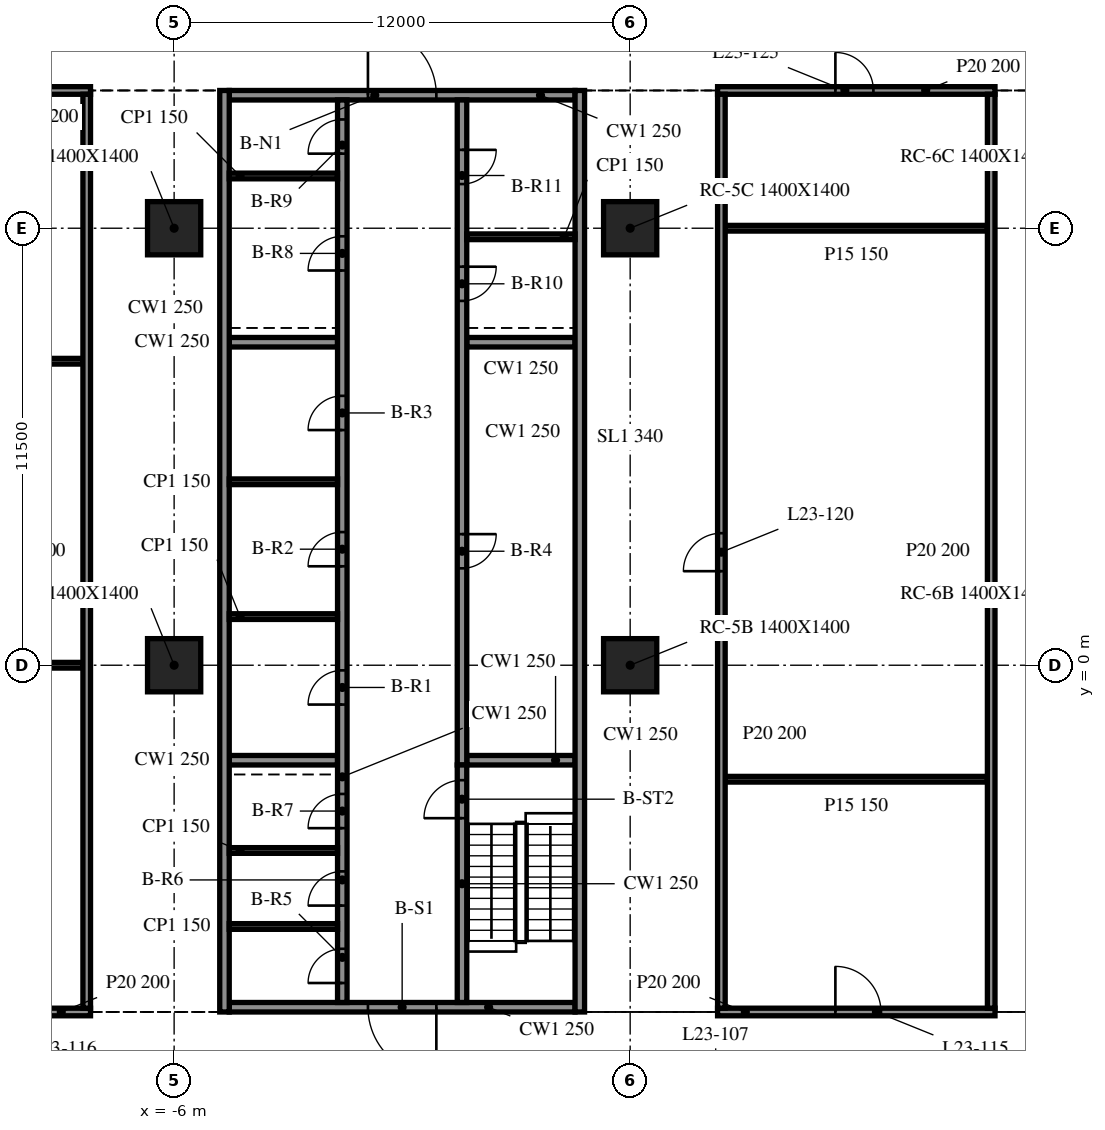
"""IFC4 building model, lengths in metres.
Left out: names, types, materials, properties, quantities, classifications, styles, units other than length and angle.
Written with IfcOpenShell. Run it as: python <this file> out.ifc"""

import sys

from ifc_helpers import new_model, si_unit, direction, frame, frame_2d, origin, origin_2d, place, context, subcontext, project, spatial, rectangle, extrude, element, fill, save


model = new_model("IFC4")
c1 = context("Model", 3, precision=1e-05, world=origin(), true_north=direction((0.0, 1.0)))
c2 = subcontext(c1, "Body", "Model", "MODEL_VIEW")
j1 = project(units=[si_unit("LENGTHUNIT", "METRE"), si_unit("PLANEANGLEUNIT", "RADIAN")], contexts=[c1])
p1 = place(None, origin())
s1 = spatial("IfcSite", under=j1, at=p1, CompositionType="ELEMENT")
p2 = place(p1, origin())
s2 = spatial("IfcBuilding", under=s1, at=p2, CompositionType="ELEMENT")
p3 = place(p2, frame((0.0, 0.0, 101.2)))
s3 = spatial("IfcBuildingStorey", under=s2, at=p3, CompositionType="ELEMENT", Elevation=101.2)
for number, where, z_axis, x_axis in (
    (1, (-6.0, 0.0, -0.34), (0.0, 0.0, 1.0), (1.0, 0.0, 0.0)),
    (2, (-6.0, 11.5, -0.34), (0.0, 0.0, 1.0), (1.0, 0.0, 0.0)),
    (3, (6.0, 0.0, -0.34), (0.0, 0.0, 1.0), (1.0, 0.0, 0.0)),
    (4, (6.0, 11.5, -0.34), (0.0, 0.0, 1.0), (1.0, 0.0, 0.0)),
):
    element("IfcColumn", number, at=place(p3, frame(where, z_axis=z_axis, x_axis=x_axis)), inside=s3, PredefinedType="COLUMN", context=c2, shape_type="SweptSolid", body=[
        extrude(rectangle(XDim=1.4, YDim=1.4, at=origin_2d()), origin(), (0.0, 0.0, 1.0), 4.1),
    ])
for number, where, z_axis, x_axis in (
    (5, (-4.675, 15.125, 0.0), (0.0, 0.0, 1.0), (0.0, -1.0, 0.0)),
    (6, (4.675, -9.125, 0.0), (0.0, 0.0, 1.0), (0.0, 1.0, 0.0)),
):
    element("IfcWall", number, at=place(p3, frame(where, z_axis=z_axis, x_axis=x_axis)), inside=s3, PredefinedType="SOLIDWALL", context=c2, shape_type="SweptSolid", body=[
        extrude(rectangle(XDim=24.25, YDim=0.25, at=frame_2d((12.125, 0.0))), origin(), (0.0, 0.0, 1.0), 3.76),
    ])
p4 = place(p3, frame((4.55, -9.0, 0.0), z_axis=(0.0, 0.0, 1.0), x_axis=(-1.0, 0.0, 0.0)))
e7 = element("IfcWall", 7, at=p4, inside=s3, PredefinedType="SOLIDWALL", context=c2, shape_type="SweptSolid", body=[
    extrude(rectangle(XDim=9.1, YDim=0.25, at=frame_2d((4.55, 0.0))), origin(), (0.0, 0.0, 1.0), 3.76),
])
p5 = place(p4, frame((3.65, 0.0, 0.0)))
e8 = element("IfcOpeningElement", 8, at=p5, cuts=e7, PredefinedType="OPENING", context=c2, shape_type="SweptSolid", body=[
    extrude(rectangle(XDim=1.8, YDim=2.1, at=frame_2d((0.9, 1.05))), frame((0.0, 0.135, 0.0), z_axis=(0.0, -1.0, 0.0), x_axis=(1.0, 0.0, 0.0)), (0.0, 0.0, 1.0), 0.27),
])
p6 = place(p3, frame((-4.55, 15.0, 0.0), z_axis=(0.0, 0.0, 1.0), x_axis=(1.0, 0.0, 0.0)))
e9 = element("IfcWall", 9, at=p6, inside=s3, PredefinedType="SOLIDWALL", context=c2, shape_type="SweptSolid", body=[
    extrude(rectangle(XDim=9.1, YDim=0.25, at=frame_2d((4.55, 0.0))), origin(), (0.0, 0.0, 1.0), 3.76),
])
p7 = place(p6, frame((3.65, 0.0, 0.0)))
e10 = element("IfcOpeningElement", 10, at=p7, cuts=e9, PredefinedType="OPENING", context=c2, shape_type="SweptSolid", body=[
    extrude(rectangle(XDim=1.8, YDim=2.1, at=frame_2d((0.9, 1.05))), frame((0.0, 0.135, 0.0), z_axis=(0.0, -1.0, 0.0), x_axis=(1.0, 0.0, 0.0)), (0.0, 0.0, 1.0), 0.27),
])
p8 = place(p3, frame((-1.575, -8.875, 0.0), z_axis=(0.0, 0.0, 1.0), x_axis=(0.0, 1.0, 0.0)))
e11 = element("IfcWall", 11, at=p8, inside=s3, PredefinedType="SOLIDWALL", context=c2, shape_type="SweptSolid", body=[
    extrude(rectangle(XDim=23.75, YDim=0.25, at=frame_2d((11.875, 0.0))), origin(), (0.0, 0.0, 1.0), 3.76),
])
p9 = place(p8, frame((7.84, 0.0, 0.0)))
e12 = element("IfcOpeningElement", 12, at=p9, cuts=e11, PredefinedType="OPENING", context=c2, shape_type="SweptSolid", body=[
    extrude(rectangle(XDim=0.9, YDim=2.1, at=frame_2d((0.45, 1.05))), frame((0.0, 0.135, 0.0), z_axis=(0.0, -1.0, 0.0), x_axis=(1.0, 0.0, 0.0)), (0.0, 0.0, 1.0), 0.27),
])
p10 = place(p8, frame((11.479, 0.0, 0.0)))
e13 = element("IfcOpeningElement", 13, at=p10, cuts=e11, PredefinedType="OPENING", context=c2, shape_type="SweptSolid", body=[
    extrude(rectangle(XDim=0.9, YDim=2.1, at=frame_2d((0.45, 1.05))), frame((0.0, 0.135, 0.0), z_axis=(0.0, -1.0, 0.0), x_axis=(1.0, 0.0, 0.0)), (0.0, 0.0, 1.0), 0.27),
])
p11 = place(p8, frame((15.064, 0.0, 0.0)))
e14 = element("IfcOpeningElement", 14, at=p11, cuts=e11, PredefinedType="OPENING", context=c2, shape_type="SweptSolid", body=[
    extrude(rectangle(XDim=0.9, YDim=2.1, at=frame_2d((0.45, 1.05))), frame((0.0, 0.135, 0.0), z_axis=(0.0, -1.0, 0.0), x_axis=(1.0, 0.0, 0.0)), (0.0, 0.0, 1.0), 0.27),
])
p12 = place(p8, frame((0.512, 0.0, 0.0)))
e15 = element("IfcOpeningElement", 15, at=p12, cuts=e11, PredefinedType="OPENING", context=c2, shape_type="SweptSolid", body=[
    extrude(rectangle(XDim=0.9, YDim=2.1, at=frame_2d((0.45, 1.05))), frame((0.0, 0.135, 0.0), z_axis=(0.0, -1.0, 0.0), x_axis=(1.0, 0.0, 0.0)), (0.0, 0.0, 1.0), 0.27),
])
p13 = place(p8, frame((2.55, 0.0, 0.0)))
e16 = element("IfcOpeningElement", 16, at=p13, cuts=e11, PredefinedType="OPENING", context=c2, shape_type="SweptSolid", body=[
    extrude(rectangle(XDim=0.9, YDim=2.1, at=frame_2d((0.45, 1.05))), frame((0.0, 0.135, 0.0), z_axis=(0.0, -1.0, 0.0), x_axis=(1.0, 0.0, 0.0)), (0.0, 0.0, 1.0), 0.27),
])
p14 = place(p8, frame((4.587, 0.0, 0.0)))
e17 = element("IfcOpeningElement", 17, at=p14, cuts=e11, PredefinedType="OPENING", context=c2, shape_type="SweptSolid", body=[
    extrude(rectangle(XDim=0.9, YDim=2.1, at=frame_2d((0.45, 1.05))), frame((0.0, 0.135, 0.0), z_axis=(0.0, -1.0, 0.0), x_axis=(1.0, 0.0, 0.0)), (0.0, 0.0, 1.0), 0.27),
])
p15 = place(p8, frame((19.262, 0.0, 0.0)))
e18 = element("IfcOpeningElement", 18, at=p15, cuts=e11, PredefinedType="OPENING", context=c2, shape_type="SweptSolid", body=[
    extrude(rectangle(XDim=0.9, YDim=2.1, at=frame_2d((0.45, 1.05))), frame((0.0, 0.135, 0.0), z_axis=(0.0, -1.0, 0.0), x_axis=(1.0, 0.0, 0.0)), (0.0, 0.0, 1.0), 0.27),
])
p16 = place(p8, frame((22.337, 0.0, 0.0)))
e19 = element("IfcOpeningElement", 19, at=p16, cuts=e11, PredefinedType="OPENING", context=c2, shape_type="SweptSolid", body=[
    extrude(rectangle(XDim=0.9, YDim=2.1, at=frame_2d((0.45, 1.05))), frame((0.0, 0.135, 0.0), z_axis=(0.0, -1.0, 0.0), x_axis=(1.0, 0.0, 0.0)), (0.0, 0.0, 1.0), 0.27),
])
p17 = place(p3, frame((1.575, -8.875, 0.0), z_axis=(0.0, 0.0, 1.0), x_axis=(0.0, 1.0, 0.0)))
e20 = element("IfcWall", 20, at=p17, inside=s3, PredefinedType="SOLIDWALL", context=c2, shape_type="SweptSolid", body=[
    extrude(rectangle(XDim=6.25, YDim=0.25, at=frame_2d((3.125, 0.0))), origin(), (0.0, 0.0, 1.0), 3.76),
])
p18 = place(p17, frame((4.85, 0.0, 0.0)))
e21 = element("IfcOpeningElement", 21, at=p18, cuts=e20, PredefinedType="OPENING", context=c2, shape_type="SweptSolid", body=[
    extrude(rectangle(XDim=1.0, YDim=2.1, at=frame_2d((0.5, 1.05))), frame((0.0, 0.135, 0.0), z_axis=(0.0, -1.0, 0.0), x_axis=(1.0, 0.0, 0.0)), (0.0, 0.0, 1.0), 0.27),
])
p19 = place(p3, frame((1.575, 14.875, 0.0), z_axis=(0.0, 0.0, 1.0), x_axis=(0.0, -1.0, 0.0)))
e22 = element("IfcWall", 22, at=p19, inside=s3, PredefinedType="SOLIDWALL", context=c2, shape_type="SweptSolid", body=[
    extrude(rectangle(XDim=17.5, YDim=0.25, at=frame_2d((8.75, 0.0))), origin(), (0.0, 0.0, 1.0), 3.76),
])
p20 = place(p19, frame((11.425, 0.0, 0.0)))
e23 = element("IfcOpeningElement", 23, at=p20, cuts=e22, PredefinedType="OPENING", context=c2, shape_type="SweptSolid", body=[
    extrude(rectangle(XDim=0.9, YDim=2.1, at=frame_2d((0.45, 1.05))), frame((0.0, 0.135, 0.0), z_axis=(0.0, -1.0, 0.0), x_axis=(1.0, 0.0, 0.0)), (0.0, 0.0, 1.0), 0.27),
])
p21 = place(p19, frame((4.387, 0.0, 0.0)))
e24 = element("IfcOpeningElement", 24, at=p21, cuts=e22, PredefinedType="OPENING", context=c2, shape_type="SweptSolid", body=[
    extrude(rectangle(XDim=0.9, YDim=2.1, at=frame_2d((0.45, 1.05))), frame((0.0, 0.135, 0.0), z_axis=(0.0, -1.0, 0.0), x_axis=(1.0, 0.0, 0.0)), (0.0, 0.0, 1.0), 0.27),
])
p22 = place(p19, frame((1.312, 0.0, 0.0)))
e25 = element("IfcOpeningElement", 25, at=p22, cuts=e22, PredefinedType="OPENING", context=c2, shape_type="SweptSolid", body=[
    extrude(rectangle(XDim=0.9, YDim=2.1, at=frame_2d((0.45, 1.05))), frame((0.0, 0.135, 0.0), z_axis=(0.0, -1.0, 0.0), x_axis=(1.0, 0.0, 0.0)), (0.0, 0.0, 1.0), 0.27),
])
for number, where, z_axis, x_axis in (
    (26, (-4.55, -2.5, 0.0), (0.0, 0.0, 1.0), (1.0, 0.0, 0.0)),
    (27, (-4.55, 8.5, 0.0), (0.0, 0.0, 1.0), (1.0, 0.0, 0.0)),
    (28, (1.7, -2.5, 0.0), (0.0, 0.0, 1.0), (1.0, 0.0, 0.0)),
    (29, (1.7, 8.5, 0.0), (0.0, 0.0, 1.0), (1.0, 0.0, 0.0)),
):
    element("IfcWall", number, at=place(p3, frame(where, z_axis=z_axis, x_axis=x_axis)), inside=s3, PredefinedType="SOLIDWALL", context=c2, shape_type="SweptSolid", body=[
        extrude(rectangle(XDim=2.85, YDim=0.25, at=frame_2d((1.425, 0.0))), origin(), (0.0, 0.0, 1.0), 3.76),
    ])
for number, where, z_axis, x_axis in (
    (30, (-4.55, 1.28, 0.0), (0.0, 0.0, 1.0), (1.0, 0.0, 0.0)),
    (31, (-4.55, 4.827, 0.0), (0.0, 0.0, 1.0), (1.0, 0.0, 0.0)),
    (32, (-4.55, -6.875, 0.0), (0.0, 0.0, 1.0), (1.0, 0.0, 0.0)),
    (33, (-4.55, -4.875, 0.0), (0.0, 0.0, 1.0), (1.0, 0.0, 0.0)),
    (34, (-4.55, 12.875, 0.0), (0.0, 0.0, 1.0), (1.0, 0.0, 0.0)),
    (35, (1.7, 11.275, 0.0), (0.0, 0.0, 1.0), (1.0, 0.0, 0.0)),
):
    element("IfcWall", number, at=place(p3, frame(where, z_axis=z_axis, x_axis=x_axis)), inside=s3, PredefinedType="PARTITIONING", context=c2, shape_type="SweptSolid", body=[
        extrude(rectangle(XDim=2.85, YDim=0.15, at=frame_2d((1.425, 0.0))), origin(), (0.0, 0.0, 1.0), 3.76),
    ])
p23 = place(p3, frame((-15.9, -9.125, 0.0), z_axis=(0.0, 0.0, 1.0), x_axis=(1.0, 0.0, 0.0)))
e36 = element("IfcWall", 36, at=p23, inside=s3, PredefinedType="PARTITIONING", context=c2, shape_type="SweptSolid", body=[
    extrude(rectangle(XDim=7.7, YDim=0.2, at=frame_2d((3.85, 0.0))), origin(), (0.0, 0.0, 1.0), 3.76),
])
p24 = place(p23, frame((3.3, 0.0, 0.0)))
e37 = element("IfcOpeningElement", 37, at=p24, cuts=e36, PredefinedType="OPENING", context=c2, shape_type="SweptSolid", body=[
    extrude(rectangle(XDim=1.2, YDim=2.1, at=frame_2d((0.6, 1.05))), frame((0.0, 0.11, 0.0), z_axis=(0.0, -1.0, 0.0), x_axis=(1.0, 0.0, 0.0)), (0.0, 0.0, 1.0), 0.22),
])
p25 = place(p3, frame((8.3, -9.125, 0.0), z_axis=(0.0, 0.0, 1.0), x_axis=(1.0, 0.0, 0.0)))
e38 = element("IfcWall", 38, at=p25, inside=s3, PredefinedType="PARTITIONING", context=c2, shape_type="SweptSolid", body=[
    extrude(rectangle(XDim=7.3, YDim=0.2, at=frame_2d((3.65, 0.0))), origin(), (0.0, 0.0, 1.0), 3.76),
])
p26 = place(p25, frame((3.1, 0.0, 0.0)))
e39 = element("IfcOpeningElement", 39, at=p26, cuts=e38, PredefinedType="OPENING", context=c2, shape_type="SweptSolid", body=[
    extrude(rectangle(XDim=1.2, YDim=2.1, at=frame_2d((0.6, 1.05))), frame((0.0, 0.11, 0.0), z_axis=(0.0, -1.0, 0.0), x_axis=(1.0, 0.0, 0.0)), (0.0, 0.0, 1.0), 0.22),
])
p27 = place(p3, frame((8.5, -3.0, 0.0), z_axis=(0.0, 0.0, 1.0), x_axis=(1.0, 0.0, 0.0)))
e40 = element("IfcWall", 40, at=p27, inside=s3, PredefinedType="PARTITIONING", context=c2, shape_type="SweptSolid", body=[
    extrude(rectangle(XDim=6.9, YDim=0.15, at=frame_2d((3.45, 0.0))), origin(), (0.0, 0.0, 1.0), 3.76),
])
for number, where, z_axis, x_axis in (
    (41, (-15.7, 0.0, 0.0), (0.0, 0.0, 1.0), (1.0, 0.0, 0.0)),
    (42, (-15.7, 8.0, 0.0), (0.0, 0.0, 1.0), (1.0, 0.0, 0.0)),
):
    element("IfcWall", number, at=place(p3, frame(where, z_axis=z_axis, x_axis=x_axis)), inside=s3, PredefinedType="PARTITIONING", context=c2, shape_type="SweptSolid", body=[
        extrude(rectangle(XDim=7.3, YDim=0.15, at=frame_2d((3.65, 0.0))), origin(), (0.0, 0.0, 1.0), 3.76),
    ])
p28 = place(p3, frame((8.5, 11.5, 0.0), z_axis=(0.0, 0.0, 1.0), x_axis=(1.0, 0.0, 0.0)))
e43 = element("IfcWall", 43, at=p28, inside=s3, PredefinedType="PARTITIONING", context=c2, shape_type="SweptSolid", body=[
    extrude(rectangle(XDim=6.9, YDim=0.15, at=frame_2d((3.45, 0.0))), origin(), (0.0, 0.0, 1.0), 3.76),
])
p29 = place(p3, frame((-15.9, 15.125, 0.0), z_axis=(0.0, 0.0, 1.0), x_axis=(1.0, 0.0, 0.0)))
e44 = element("IfcWall", 44, at=p29, inside=s3, PredefinedType="PARTITIONING", context=c2, shape_type="SweptSolid", body=[
    extrude(rectangle(XDim=7.7, YDim=0.2, at=frame_2d((3.85, 0.0))), origin(), (0.0, 0.0, 1.0), 3.76),
])
p30 = place(p29, frame((3.3, 0.0, 0.0)))
e45 = element("IfcOpeningElement", 45, at=p30, cuts=e44, PredefinedType="OPENING", context=c2, shape_type="SweptSolid", body=[
    extrude(rectangle(XDim=1.0, YDim=2.1, at=frame_2d((0.5, 1.05))), frame((0.0, 0.11, 0.0), z_axis=(0.0, -1.0, 0.0), x_axis=(1.0, 0.0, 0.0)), (0.0, 0.0, 1.0), 0.22),
])
p31 = place(p3, frame((8.3, 15.125, 0.0), z_axis=(0.0, 0.0, 1.0), x_axis=(1.0, 0.0, 0.0)))
e46 = element("IfcWall", 46, at=p31, inside=s3, PredefinedType="PARTITIONING", context=c2, shape_type="SweptSolid", body=[
    extrude(rectangle(XDim=7.3, YDim=0.2, at=frame_2d((3.65, 0.0))), origin(), (0.0, 0.0, 1.0), 3.76),
])
p32 = place(p31, frame((3.1, 0.0, 0.0)))
e47 = element("IfcOpeningElement", 47, at=p32, cuts=e46, PredefinedType="OPENING", context=c2, shape_type="SweptSolid", body=[
    extrude(rectangle(XDim=1.0, YDim=2.1, at=frame_2d((0.5, 1.05))), frame((0.0, 0.11, 0.0), z_axis=(0.0, -1.0, 0.0), x_axis=(1.0, 0.0, 0.0)), (0.0, 0.0, 1.0), 0.22),
])
p33 = place(p3, frame((-8.3, -9.025, 0.0), z_axis=(0.0, 0.0, 1.0), x_axis=(0.0, 1.0, 0.0)))
e48 = element("IfcWall", 48, at=p33, inside=s3, PredefinedType="PARTITIONING", context=c2, shape_type="SweptSolid", body=[
    extrude(rectangle(XDim=24.05, YDim=0.2, at=frame_2d((12.025, 0.0))), origin(), (0.0, 0.0, 1.0), 3.76),
])
p34 = place(p3, frame((8.4, -9.025, 0.0), z_axis=(0.0, 0.0, 1.0), x_axis=(0.0, 1.0, 0.0)))
e49 = element("IfcWall", 49, at=p34, inside=s3, PredefinedType="PARTITIONING", context=c2, shape_type="SweptSolid", body=[
    extrude(rectangle(XDim=24.05, YDim=0.2, at=frame_2d((12.025, 0.0))), origin(), (0.0, 0.0, 1.0), 3.76),
])
p35 = place(p34, frame((11.5, 0.0, 0.0)))
e50 = element("IfcOpeningElement", 50, at=p35, cuts=e49, PredefinedType="OPENING", context=c2, shape_type="SweptSolid", body=[
    extrude(rectangle(XDim=1.0, YDim=2.1, at=frame_2d((0.5, 1.05))), frame((0.0, 0.11, 0.0), z_axis=(0.0, -1.0, 0.0), x_axis=(1.0, 0.0, 0.0)), (0.0, 0.0, 1.0), 0.22),
])
p36 = place(p3, frame((15.5, -9.025, 0.0), z_axis=(0.0, 0.0, 1.0), x_axis=(0.0, 1.0, 0.0)))
e51 = element("IfcWall", 51, at=p36, inside=s3, PredefinedType="PARTITIONING", context=c2, shape_type="SweptSolid", body=[
    extrude(rectangle(XDim=24.05, YDim=0.2, at=frame_2d((12.025, 0.0))), origin(), (0.0, 0.0, 1.0), 3.76),
])
p37 = place(p5, origin())
e52 = element("IfcDoor", 52, at=p37, inside=s3, OperationType="DOUBLE_DOOR_SINGLE_SWING", PredefinedType="DOOR", context=c2, shape_type="SweptSolid", body=[
    extrude(rectangle(XDim=1.8, YDim=2.1, at=frame_2d((0.9, 1.05))), frame((0.0, 0.025, 0.0), z_axis=(0.0, -1.0, 0.0), x_axis=(1.0, 0.0, 0.0)), (0.0, 0.0, 1.0), 0.05),
])
fill(e8, e52)
p38 = place(p7, origin())
e53 = element("IfcDoor", 53, at=p38, inside=s3, OperationType="DOUBLE_DOOR_SINGLE_SWING", PredefinedType="DOOR", context=c2, shape_type="SweptSolid", body=[
    extrude(rectangle(XDim=1.8, YDim=2.1, at=frame_2d((0.9, 1.05))), frame((0.0, 0.025, 0.0), z_axis=(0.0, -1.0, 0.0), x_axis=(1.0, 0.0, 0.0)), (0.0, 0.0, 1.0), 0.05),
])
fill(e10, e53)
p39 = place(p9, origin())
e54 = element("IfcDoor", 54, at=p39, inside=s3, OperationType="SINGLE_SWING_LEFT", PredefinedType="DOOR", context=c2, shape_type="SweptSolid", body=[
    extrude(rectangle(XDim=0.9, YDim=2.1, at=frame_2d((0.45, 1.05))), frame((0.0, 0.025, 0.0), z_axis=(0.0, -1.0, 0.0), x_axis=(1.0, 0.0, 0.0)), (0.0, 0.0, 1.0), 0.05),
])
fill(e12, e54)
p40 = place(p10, origin())
e55 = element("IfcDoor", 55, at=p40, inside=s3, OperationType="SINGLE_SWING_RIGHT", PredefinedType="DOOR", context=c2, shape_type="SweptSolid", body=[
    extrude(rectangle(XDim=0.9, YDim=2.1, at=frame_2d((0.45, 1.05))), frame((0.0, 0.025, 0.0), z_axis=(0.0, -1.0, 0.0), x_axis=(1.0, 0.0, 0.0)), (0.0, 0.0, 1.0), 0.05),
])
fill(e13, e55)
p41 = place(p11, origin())
e56 = element("IfcDoor", 56, at=p41, inside=s3, OperationType="SINGLE_SWING_LEFT", PredefinedType="DOOR", context=c2, shape_type="SweptSolid", body=[
    extrude(rectangle(XDim=0.9, YDim=2.1, at=frame_2d((0.45, 1.05))), frame((0.0, 0.025, 0.0), z_axis=(0.0, -1.0, 0.0), x_axis=(1.0, 0.0, 0.0)), (0.0, 0.0, 1.0), 0.05),
])
fill(e14, e56)
p42 = place(p20, origin())
e57 = element("IfcDoor", 57, at=p42, inside=s3, OperationType="SINGLE_SWING_RIGHT", PredefinedType="DOOR", context=c2, shape_type="SweptSolid", body=[
    extrude(rectangle(XDim=0.9, YDim=2.1, at=frame_2d((0.45, 1.05))), frame((0.0, 0.025, 0.0), z_axis=(0.0, -1.0, 0.0), x_axis=(1.0, 0.0, 0.0)), (0.0, 0.0, 1.0), 0.05),
])
fill(e23, e57)
p43 = place(p12, origin())
e58 = element("IfcDoor", 58, at=p43, inside=s3, OperationType="SINGLE_SWING_LEFT", PredefinedType="DOOR", context=c2, shape_type="SweptSolid", body=[
    extrude(rectangle(XDim=0.9, YDim=2.1, at=frame_2d((0.45, 1.05))), frame((0.0, 0.025, 0.0), z_axis=(0.0, -1.0, 0.0), x_axis=(1.0, 0.0, 0.0)), (0.0, 0.0, 1.0), 0.05),
])
fill(e15, e58)
p44 = place(p13, origin())
e59 = element("IfcDoor", 59, at=p44, inside=s3, OperationType="SINGLE_SWING_RIGHT", PredefinedType="DOOR", context=c2, shape_type="SweptSolid", body=[
    extrude(rectangle(XDim=0.9, YDim=2.1, at=frame_2d((0.45, 1.05))), frame((0.0, 0.025, 0.0), z_axis=(0.0, -1.0, 0.0), x_axis=(1.0, 0.0, 0.0)), (0.0, 0.0, 1.0), 0.05),
])
fill(e16, e59)
p45 = place(p14, origin())
e60 = element("IfcDoor", 60, at=p45, inside=s3, OperationType="SINGLE_SWING_LEFT", PredefinedType="DOOR", context=c2, shape_type="SweptSolid", body=[
    extrude(rectangle(XDim=0.9, YDim=2.1, at=frame_2d((0.45, 1.05))), frame((0.0, 0.025, 0.0), z_axis=(0.0, -1.0, 0.0), x_axis=(1.0, 0.0, 0.0)), (0.0, 0.0, 1.0), 0.05),
])
fill(e17, e60)
p46 = place(p15, origin())
e61 = element("IfcDoor", 61, at=p46, inside=s3, OperationType="SINGLE_SWING_RIGHT", PredefinedType="DOOR", context=c2, shape_type="SweptSolid", body=[
    extrude(rectangle(XDim=0.9, YDim=2.1, at=frame_2d((0.45, 1.05))), frame((0.0, 0.025, 0.0), z_axis=(0.0, -1.0, 0.0), x_axis=(1.0, 0.0, 0.0)), (0.0, 0.0, 1.0), 0.05),
])
fill(e18, e61)
p47 = place(p16, origin())
e62 = element("IfcDoor", 62, at=p47, inside=s3, OperationType="SINGLE_SWING_LEFT", PredefinedType="DOOR", context=c2, shape_type="SweptSolid", body=[
    extrude(rectangle(XDim=0.9, YDim=2.1, at=frame_2d((0.45, 1.05))), frame((0.0, 0.025, 0.0), z_axis=(0.0, -1.0, 0.0), x_axis=(1.0, 0.0, 0.0)), (0.0, 0.0, 1.0), 0.05),
])
fill(e19, e62)
p48 = place(p21, origin())
e63 = element("IfcDoor", 63, at=p48, inside=s3, OperationType="SINGLE_SWING_RIGHT", PredefinedType="DOOR", context=c2, shape_type="SweptSolid", body=[
    extrude(rectangle(XDim=0.9, YDim=2.1, at=frame_2d((0.45, 1.05))), frame((0.0, 0.025, 0.0), z_axis=(0.0, -1.0, 0.0), x_axis=(1.0, 0.0, 0.0)), (0.0, 0.0, 1.0), 0.05),
])
fill(e24, e63)
p49 = place(p22, origin())
e64 = element("IfcDoor", 64, at=p49, inside=s3, OperationType="SINGLE_SWING_LEFT", PredefinedType="DOOR", context=c2, shape_type="SweptSolid", body=[
    extrude(rectangle(XDim=0.9, YDim=2.1, at=frame_2d((0.45, 1.05))), frame((0.0, 0.025, 0.0), z_axis=(0.0, -1.0, 0.0), x_axis=(1.0, 0.0, 0.0)), (0.0, 0.0, 1.0), 0.05),
])
fill(e25, e64)
p50 = place(p18, origin())
e65 = element("IfcDoor", 65, at=p50, inside=s3, OperationType="SINGLE_SWING_RIGHT", PredefinedType="DOOR", context=c2, shape_type="SweptSolid", body=[
    extrude(rectangle(XDim=1.0, YDim=2.1, at=frame_2d((0.5, 1.05))), frame((0.0, 0.025, 0.0), z_axis=(0.0, -1.0, 0.0), x_axis=(1.0, 0.0, 0.0)), (0.0, 0.0, 1.0), 0.05),
])
fill(e21, e65)
p51 = place(p26, origin())
e66 = element("IfcDoor", 66, at=p51, inside=s3, OperationType="SINGLE_SWING_RIGHT", PredefinedType="DOOR", context=c2, shape_type="SweptSolid", body=[
    extrude(rectangle(XDim=1.2, YDim=2.1, at=frame_2d((0.6, 1.05))), frame((0.0, 0.025, 0.0), z_axis=(0.0, -1.0, 0.0), x_axis=(1.0, 0.0, 0.0)), (0.0, 0.0, 1.0), 0.05),
])
fill(e39, e66)
p52 = place(p35, origin())
e67 = element("IfcDoor", 67, at=p52, inside=s3, OperationType="SINGLE_SWING_RIGHT", PredefinedType="DOOR", context=c2, shape_type="SweptSolid", body=[
    extrude(rectangle(XDim=1.0, YDim=2.1, at=frame_2d((0.5, 1.05))), frame((0.0, 0.025, 0.0), z_axis=(0.0, -1.0, 0.0), x_axis=(1.0, 0.0, 0.0)), (0.0, 0.0, 1.0), 0.05),
])
fill(e50, e67)
p53 = place(p32, origin())
e68 = element("IfcDoor", 68, at=p53, inside=s3, OperationType="SINGLE_SWING_RIGHT", PredefinedType="DOOR", context=c2, shape_type="SweptSolid", body=[
    extrude(rectangle(XDim=1.0, YDim=2.1, at=frame_2d((0.5, 1.05))), frame((0.0, 0.025, 0.0), z_axis=(0.0, -1.0, 0.0), x_axis=(1.0, 0.0, 0.0)), (0.0, 0.0, 1.0), 0.05),
])
fill(e47, e68)
save(model, sys.argv[1])
